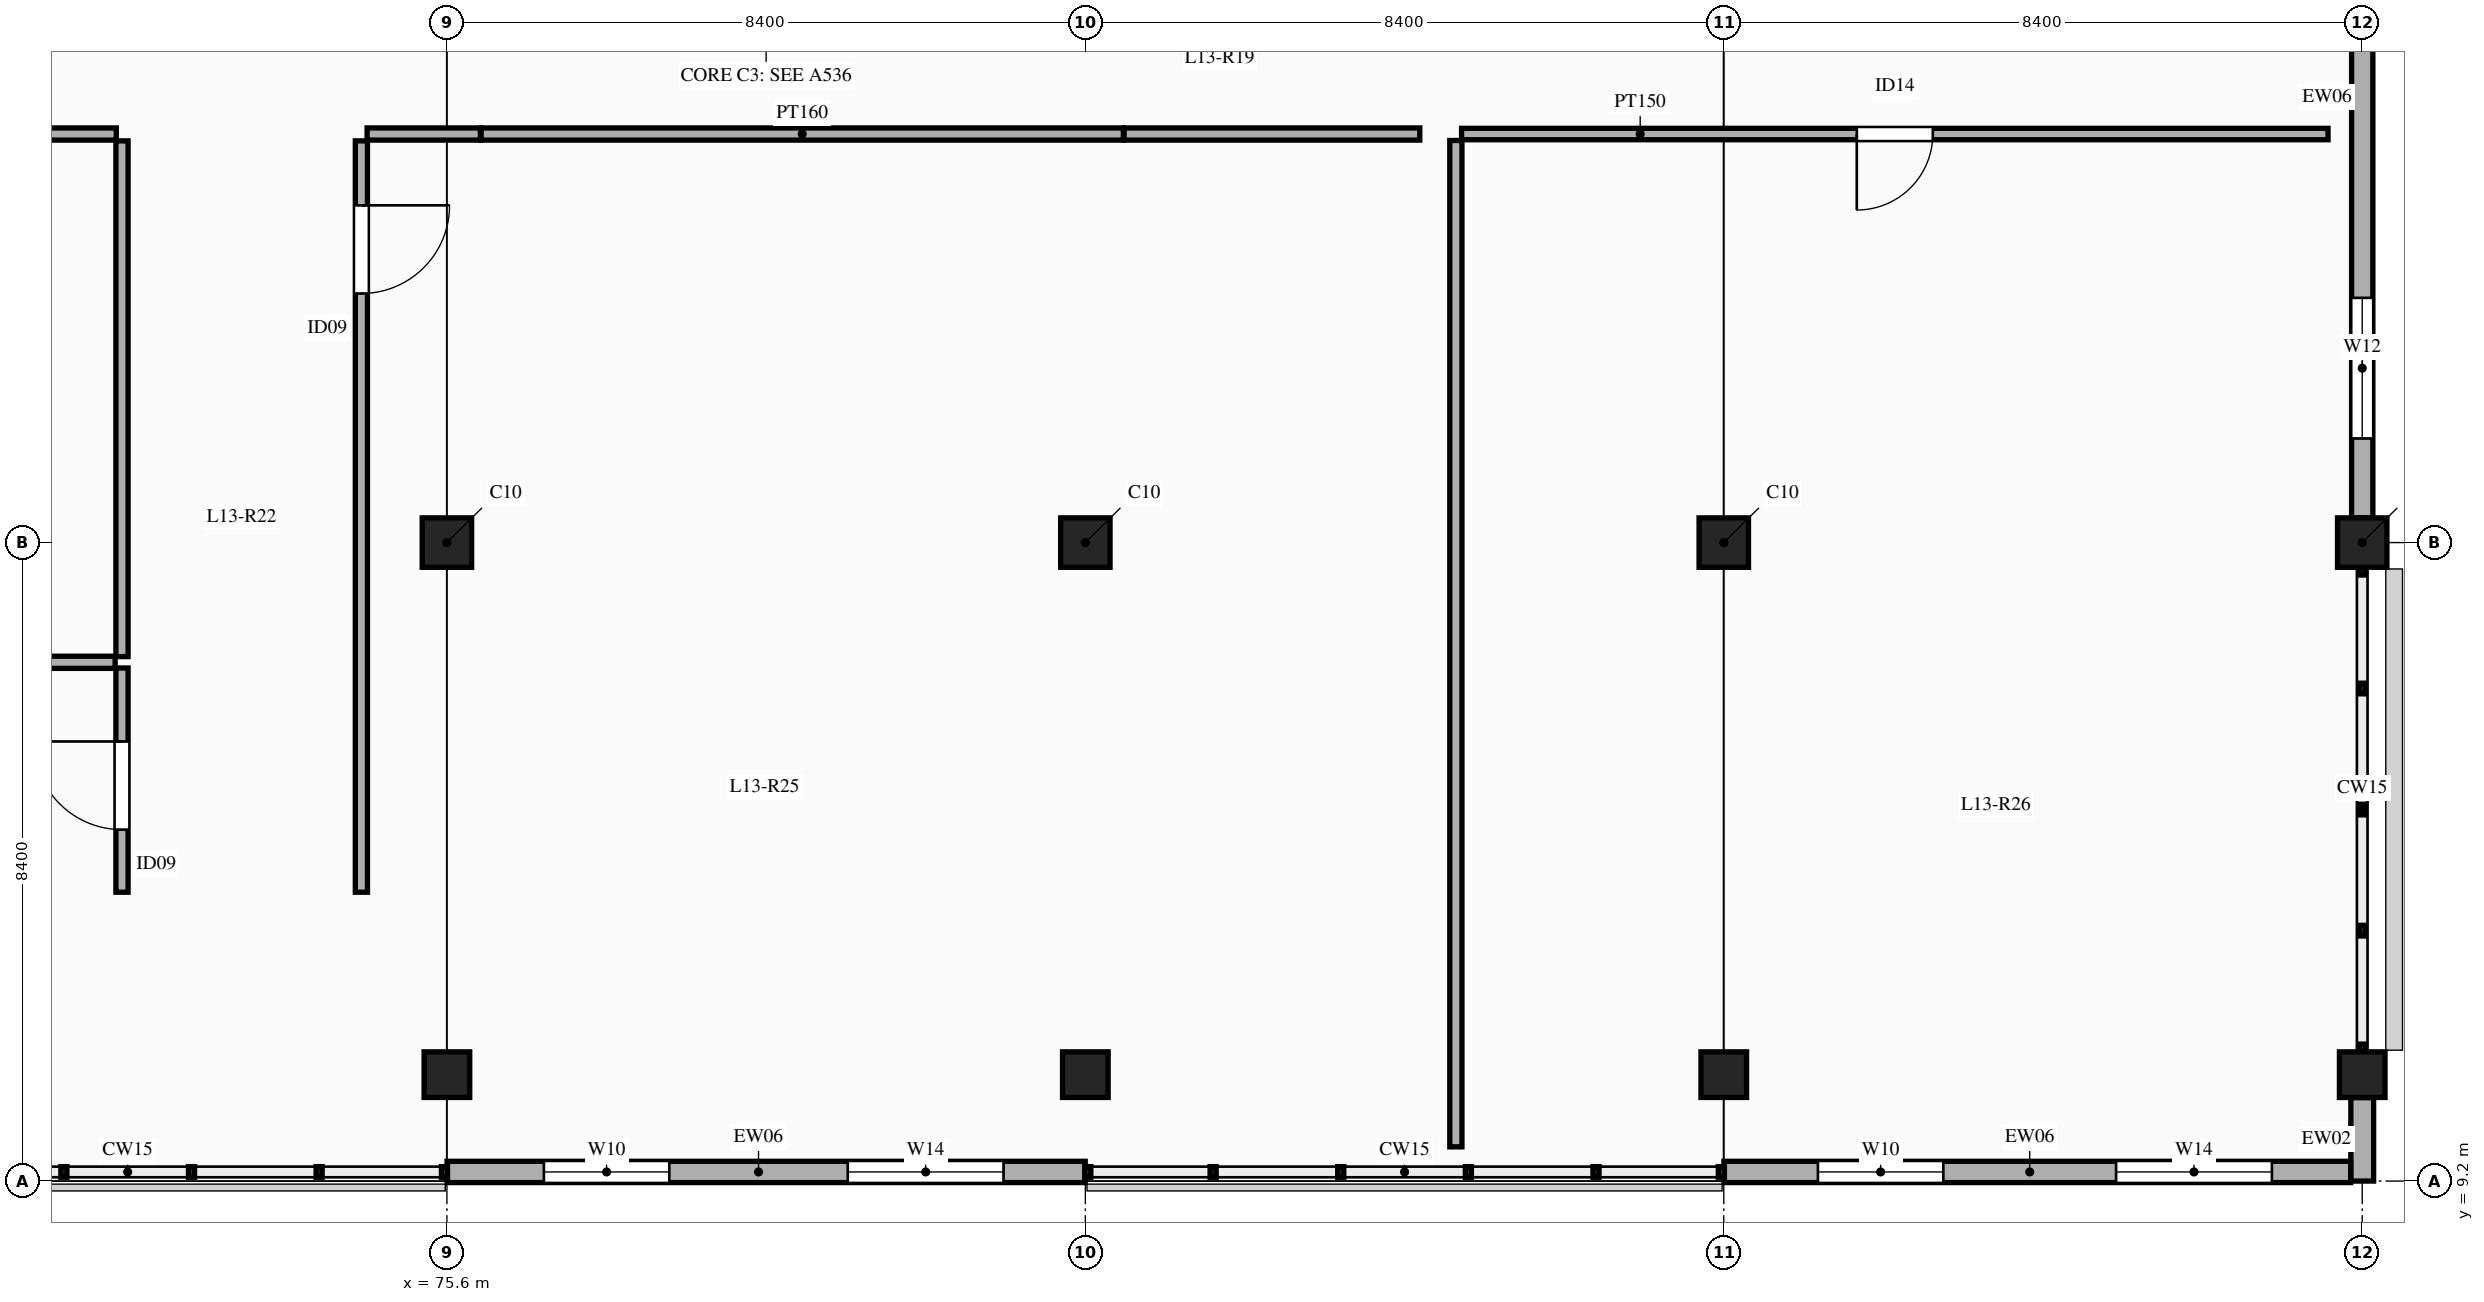
"""IFC4 building model, lengths in metres.
Left out: names, types, materials, properties, quantities, classifications, styles, units other than length and angle.
Written with IfcOpenShell. Run it as: python <this file> out.ifc"""

import sys

from ifc_helpers import new_model, si_unit, direction, frame, frame_2d, origin, origin_2d, place, context, subcontext, project, spatial, rectangle, extrude, element, fill, save


model = new_model("IFC4")
c1 = context("Model", 3, precision=1e-05, world=origin(), true_north=direction((0.0, 1.0)))
c2 = subcontext(c1, "Body", "Model", "MODEL_VIEW")
j1 = project(units=[si_unit("LENGTHUNIT", "METRE"), si_unit("PLANEANGLEUNIT", "RADIAN")], contexts=[c1])
p1 = place(None, origin())
s1 = spatial("IfcSite", under=j1, at=p1, CompositionType="ELEMENT")
p2 = place(p1, origin())
s2 = spatial("IfcBuilding", under=s1, at=p2, CompositionType="ELEMENT")
p3 = place(p2, frame((0.0, 0.0, 60.0)))
s3 = spatial("IfcBuildingStorey", under=s2, at=p3, CompositionType="ELEMENT", Elevation=60.0)
p4 = place(p3, frame((75.6, 10.6, 0.0), z_axis=(0.0, 0.0, 1.0), x_axis=(1.0, 0.0, 0.0)))
e1 = element("IfcColumn", 1, at=p4, inside=s3, PredefinedType="COLUMN", context=c2, shape_type="SweptSolid", body=[
    extrude(rectangle(XDim=0.6, YDim=0.6, at=origin_2d()), origin(), (0.0, 0.0, 1.0), 4.5),
])
p5 = place(p3, frame((75.6, 17.6, 0.0), z_axis=(0.0, 0.0, 1.0), x_axis=(1.0, 0.0, 0.0)))
e2 = element("IfcColumn", 2, at=p5, inside=s3, PredefinedType="COLUMN", context=c2, shape_type="SweptSolid", body=[
    extrude(rectangle(XDim=0.65, YDim=0.65, at=origin_2d()), origin(), (0.0, 0.0, 1.0), 4.5),
])
p6 = place(p3, frame((84.0, 10.6, 0.0), z_axis=(0.0, 0.0, 1.0), x_axis=(1.0, 0.0, 0.0)))
e3 = element("IfcColumn", 3, at=p6, inside=s3, PredefinedType="COLUMN", context=c2, shape_type="SweptSolid", body=[
    extrude(rectangle(XDim=0.6, YDim=0.6, at=origin_2d()), origin(), (0.0, 0.0, 1.0), 4.5),
])
p7 = place(p3, frame((84.0, 17.6, 0.0), z_axis=(0.0, 0.0, 1.0), x_axis=(1.0, 0.0, 0.0)))
e4 = element("IfcColumn", 4, at=p7, inside=s3, PredefinedType="COLUMN", context=c2, shape_type="SweptSolid", body=[
    extrude(rectangle(XDim=0.65, YDim=0.65, at=origin_2d()), origin(), (0.0, 0.0, 1.0), 4.5),
])
p8 = place(p3, frame((92.4, 10.6, 0.0), z_axis=(0.0, 0.0, 1.0), x_axis=(1.0, 0.0, 0.0)))
e5 = element("IfcColumn", 5, at=p8, inside=s3, PredefinedType="COLUMN", context=c2, shape_type="SweptSolid", body=[
    extrude(rectangle(XDim=0.6, YDim=0.6, at=origin_2d()), origin(), (0.0, 0.0, 1.0), 4.5),
])
p9 = place(p3, frame((92.4, 17.6, 0.0), z_axis=(0.0, 0.0, 1.0), x_axis=(1.0, 0.0, 0.0)))
e6 = element("IfcColumn", 6, at=p9, inside=s3, PredefinedType="COLUMN", context=c2, shape_type="SweptSolid", body=[
    extrude(rectangle(XDim=0.65, YDim=0.65, at=origin_2d()), origin(), (0.0, 0.0, 1.0), 4.5),
])
p10 = place(p3, frame((100.8, 10.6, 0.0), z_axis=(0.0, 0.0, 1.0), x_axis=(1.0, 0.0, 0.0)))
e7 = element("IfcColumn", 7, at=p10, inside=s3, PredefinedType="COLUMN", context=c2, shape_type="SweptSolid", body=[
    extrude(rectangle(XDim=0.6, YDim=0.6, at=origin_2d()), origin(), (0.0, 0.0, 1.0), 4.5),
])
p11 = place(p3, frame((100.8, 17.6, 0.0), z_axis=(0.0, 0.0, 1.0), x_axis=(1.0, 0.0, 0.0)))
e8 = element("IfcColumn", 8, at=p11, inside=s3, PredefinedType="COLUMN", context=c2, shape_type="SweptSolid", body=[
    extrude(rectangle(XDim=0.65, YDim=0.65, at=origin_2d()), origin(), (0.0, 0.0, 1.0), 4.5),
])
p12 = place(p3, frame((100.8, 9.2, 0.0), z_axis=(0.0, 0.0, 1.0), x_axis=(0.0, 1.0, 0.0)))
e9 = element("IfcWall", 9, at=p12, inside=s3, PredefinedType="SOLIDWALL", context=c2, shape_type="SweptSolid", body=[
    extrude(rectangle(XDim=1.098, YDim=0.3, at=frame_2d((0.549, 0.0))), origin(), (0.0, 0.0, 1.0), 3.55),
])
p13 = place(p3, frame((75.602, 9.32, 0.0), z_axis=(0.0, 0.0, 1.0), x_axis=(1.0, 0.0, 0.0)))
e10 = element("IfcWall", 10, at=p13, inside=s3, PredefinedType="ELEMENTEDWALL", context=c2, shape_type="SweptSolid", body=[
    extrude(rectangle(XDim=8.396, YDim=0.28, at=frame_2d((4.198, 0.0))), origin(), (0.0, 0.0, 1.0), 3.55),
])
p14 = place(p13, frame((1.274, 0.0, 0.9)))
e11 = element("IfcOpeningElement", 11, at=p14, cuts=e10, PredefinedType="OPENING", context=c2, shape_type="SweptSolid", body=[
    extrude(rectangle(XDim=1.65, YDim=1.95, at=frame_2d((0.825, 0.975))), frame((0.0, 0.15, 0.0), z_axis=(0.0, -1.0, 0.0), x_axis=(1.0, 0.0, 0.0)), (0.0, 0.0, 1.0), 0.3),
])
p15 = place(p13, frame((5.272, 0.0, 0.9)))
e12 = element("IfcOpeningElement", 12, at=p15, cuts=e10, PredefinedType="OPENING", context=c2, shape_type="SweptSolid", body=[
    extrude(rectangle(XDim=2.05, YDim=2.1, at=frame_2d((1.025, 1.05))), frame((0.0, 0.15, 0.0), z_axis=(0.0, -1.0, 0.0), x_axis=(1.0, 0.0, 0.0)), (0.0, 0.0, 1.0), 0.3),
])
p16 = place(p3, frame((92.402, 9.32, 0.0), z_axis=(0.0, 0.0, 1.0), x_axis=(1.0, 0.0, 0.0)))
e13 = element("IfcWall", 13, at=p16, inside=s3, PredefinedType="ELEMENTEDWALL", context=c2, shape_type="SweptSolid", body=[
    extrude(rectangle(XDim=8.246, YDim=0.28, at=frame_2d((4.123, 0.0))), origin(), (0.0, 0.0, 1.0), 3.55),
])
p17 = place(p16, frame((1.237, 0.0, 0.9)))
e14 = element("IfcOpeningElement", 14, at=p17, cuts=e13, PredefinedType="OPENING", context=c2, shape_type="SweptSolid", body=[
    extrude(rectangle(XDim=1.65, YDim=1.95, at=frame_2d((0.825, 0.975))), frame((0.0, 0.15, 0.0), z_axis=(0.0, -1.0, 0.0), x_axis=(1.0, 0.0, 0.0)), (0.0, 0.0, 1.0), 0.3),
])
p18 = place(p16, frame((5.159, 0.0, 0.9)))
e15 = element("IfcOpeningElement", 15, at=p18, cuts=e13, PredefinedType="OPENING", context=c2, shape_type="SweptSolid", body=[
    extrude(rectangle(XDim=2.05, YDim=2.1, at=frame_2d((1.025, 1.05))), frame((0.0, 0.15, 0.0), z_axis=(0.0, -1.0, 0.0), x_axis=(1.0, 0.0, 0.0)), (0.0, 0.0, 1.0), 0.3),
])
p19 = place(p3, frame((100.8, 17.927, 0.0), z_axis=(0.0, 0.0, 1.0), x_axis=(0.0, 1.0, 0.0)))
e16 = element("IfcWall", 16, at=p19, inside=s3, PredefinedType="ELEMENTEDWALL", context=c2, shape_type="SweptSolid", body=[
    extrude(rectangle(XDim=7.871, YDim=0.28, at=frame_2d((3.936, 0.0))), origin(), (0.0, 0.0, 1.0), 3.55),
])
p20 = place(p19, frame((1.043, 0.0, 0.9)))
e17 = element("IfcOpeningElement", 17, at=p20, cuts=e16, PredefinedType="OPENING", context=c2, shape_type="SweptSolid", body=[
    extrude(rectangle(XDim=1.85, YDim=2.05, at=frame_2d((0.925, 1.025))), frame((0.0, 0.15, 0.0), z_axis=(0.0, -1.0, 0.0), x_axis=(1.0, 0.0, 0.0)), (0.0, 0.0, 1.0), 0.3),
])
p21 = place(p3, frame((76.05, 22.975, 0.0), z_axis=(0.0, 0.0, 1.0), x_axis=(1.0, 0.0, 0.0)))
e18 = element("IfcWall", 18, at=p21, inside=s3, PredefinedType="PARTITIONING", context=c2, shape_type="SweptSolid", body=[
    extrude(rectangle(XDim=8.45, YDim=0.16, at=frame_2d((4.225, 0.0))), origin(), (0.0, 0.0, 1.0), 3.45),
])
p22 = place(p3, frame((84.51, 22.975, 0.0), z_axis=(0.0, 0.0, 1.0), x_axis=(1.0, 0.0, 0.0)))
e19 = element("IfcWall", 19, at=p22, inside=s3, PredefinedType="PARTITIONING", context=c2, shape_type="SweptSolid", body=[
    extrude(rectangle(XDim=3.89, YDim=0.16, at=frame_2d((1.945, 0.0))), origin(), (0.0, 0.0, 1.0), 3.45),
])
p23 = place(p3, frame((59.25, 22.975, 0.0), z_axis=(0.0, 0.0, 1.0), x_axis=(1.0, 0.0, 0.0)))
e20 = element("IfcWall", 20, at=p23, inside=s3, PredefinedType="PARTITIONING", context=c2, shape_type="SweptSolid", body=[
    extrude(rectangle(XDim=12.0, YDim=0.16, at=frame_2d((6.0, 0.0))), origin(), (0.0, 0.0, 1.0), 3.45),
])
p24 = place(p23, frame((5.345, 0.0, 0.0)))
e21 = element("IfcOpeningElement", 21, at=p24, cuts=e20, PredefinedType="OPENING", context=c2, shape_type="SweptSolid", body=[
    extrude(rectangle(XDim=1.16, YDim=2.2, at=frame_2d((0.58, 1.1))), frame((0.0, 0.09, 0.0), z_axis=(0.0, -1.0, 0.0), x_axis=(1.0, 0.0, 0.0)), (0.0, 0.0, 1.0), 0.18),
])
p25 = place(p3, frame((74.55, 22.975, 0.0), z_axis=(0.0, 0.0, 1.0), x_axis=(1.0, 0.0, 0.0)))
e22 = element("IfcWall", 22, at=p25, inside=s3, PredefinedType="PARTITIONING", context=c2, shape_type="SweptSolid", body=[
    extrude(rectangle(XDim=1.49, YDim=0.16, at=frame_2d((0.745, 0.0))), origin(), (0.0, 0.0, 1.0), 3.45),
])
p26 = place(p3, frame((88.95, 22.975, 0.0), z_axis=(0.0, 0.0, 1.0), x_axis=(1.0, 0.0, 0.0)))
e23 = element("IfcWall", 23, at=p26, inside=s3, PredefinedType="PARTITIONING", context=c2, shape_type="SweptSolid", body=[
    extrude(rectangle(XDim=11.4, YDim=0.15, at=frame_2d((5.7, 0.0))), origin(), (0.0, 0.0, 1.0), 3.45),
])
p27 = place(p26, frame((5.2, 0.0, 0.0)))
e24 = element("IfcOpeningElement", 24, at=p27, cuts=e23, PredefinedType="OPENING", context=c2, shape_type="SweptSolid", body=[
    extrude(rectangle(XDim=1.0, YDim=2.15, at=frame_2d((0.5, 1.075))), frame((0.0, 0.085, 0.0), z_axis=(0.0, -1.0, 0.0), x_axis=(1.0, 0.0, 0.0)), (0.0, 0.0, 1.0), 0.17),
])
p28 = place(p3, frame((71.325, 16.1, 0.0), z_axis=(0.0, 0.0, 1.0), x_axis=(0.0, 1.0, 0.0)))
e25 = element("IfcWall", 25, at=p28, inside=s3, PredefinedType="PARTITIONING", context=c2, shape_type="SweptSolid", body=[
    extrude(rectangle(XDim=6.785, YDim=0.16, at=frame_2d((3.393, 0.0))), origin(), (0.0, 0.0, 1.0), 3.45),
])
p29 = place(p3, frame((71.325, 13.0, 0.0), z_axis=(0.0, 0.0, 1.0), x_axis=(0.0, 1.0, 0.0)))
e26 = element("IfcWall", 26, at=p29, inside=s3, PredefinedType="PARTITIONING", context=c2, shape_type="SweptSolid", body=[
    extrude(rectangle(XDim=2.95, YDim=0.16, at=frame_2d((1.475, 0.0))), origin(), (0.0, 0.0, 1.0), 3.45),
])
p30 = place(p29, frame((0.823, 0.0, 0.0)))
e27 = element("IfcOpeningElement", 27, at=p30, cuts=e26, PredefinedType="OPENING", context=c2, shape_type="SweptSolid", body=[
    extrude(rectangle(XDim=1.16, YDim=2.2, at=frame_2d((0.58, 1.1))), frame((0.0, 0.09, 0.0), z_axis=(0.0, -1.0, 0.0), x_axis=(1.0, 0.0, 0.0)), (0.0, 0.0, 1.0), 0.18),
])
p31 = place(p3, frame((74.475, 13.0, 0.0), z_axis=(0.0, 0.0, 1.0), x_axis=(0.0, 1.0, 0.0)))
e28 = element("IfcWall", 28, at=p31, inside=s3, PredefinedType="PARTITIONING", context=c2, shape_type="SweptSolid", body=[
    extrude(rectangle(XDim=9.885, YDim=0.16, at=frame_2d((4.942, 0.0))), origin(), (0.0, 0.0, 1.0), 3.45),
])
p32 = place(p31, frame((7.877, 0.0, 0.0)))
e29 = element("IfcOpeningElement", 29, at=p32, cuts=e28, PredefinedType="OPENING", context=c2, shape_type="SweptSolid", body=[
    extrude(rectangle(XDim=1.16, YDim=2.2, at=frame_2d((0.58, 1.1))), frame((0.0, 0.09, 0.0), z_axis=(0.0, -1.0, 0.0), x_axis=(1.0, 0.0, 0.0)), (0.0, 0.0, 1.0), 0.18),
])
p33 = place(p3, frame((59.25, 16.025, 0.0), z_axis=(0.0, 0.0, 1.0), x_axis=(1.0, 0.0, 0.0)))
e30 = element("IfcWall", 30, at=p33, inside=s3, PredefinedType="PARTITIONING", context=c2, shape_type="SweptSolid", body=[
    extrude(rectangle(XDim=11.985, YDim=0.16, at=frame_2d((5.993, 0.0))), origin(), (0.0, 0.0, 1.0), 3.45),
])
p34 = place(p3, frame((88.875, 9.65, 0.0), z_axis=(0.0, 0.0, 1.0), x_axis=(0.0, 1.0, 0.0)))
e31 = element("IfcWall", 31, at=p34, inside=s3, PredefinedType="PARTITIONING", context=c2, shape_type="SweptSolid", body=[
    extrude(rectangle(XDim=13.24, YDim=0.16, at=frame_2d((6.62, 0.0))), origin(), (0.0, 0.0, 1.0), 3.45),
])
p35 = place(p14, origin())
e32 = element("IfcWindow", 32, at=p35, inside=s3, PartitioningType="DOUBLE_PANEL_HORIZONTAL", PredefinedType="WINDOW", context=c2, shape_type="SweptSolid", body=[
    extrude(rectangle(XDim=1.65, YDim=1.95, at=frame_2d((0.825, 0.975))), frame((0.0, 0.03, 0.0), z_axis=(0.0, -1.0, 0.0), x_axis=(1.0, 0.0, 0.0)), (0.0, 0.0, 1.0), 0.06),
])
fill(e11, e32)
p36 = place(p15, origin())
e33 = element("IfcWindow", 33, at=p36, inside=s3, PartitioningType="TRIPLE_PANEL_VERTICAL", PredefinedType="WINDOW", context=c2, shape_type="SweptSolid", body=[
    extrude(rectangle(XDim=2.05, YDim=2.1, at=frame_2d((1.025, 1.05))), frame((0.0, 0.03, 0.0), z_axis=(0.0, -1.0, 0.0), x_axis=(1.0, 0.0, 0.0)), (0.0, 0.0, 1.0), 0.06),
])
fill(e12, e33)
p37 = place(p17, origin())
e34 = element("IfcWindow", 34, at=p37, inside=s3, PartitioningType="DOUBLE_PANEL_HORIZONTAL", PredefinedType="WINDOW", context=c2, shape_type="SweptSolid", body=[
    extrude(rectangle(XDim=1.65, YDim=1.95, at=frame_2d((0.825, 0.975))), frame((0.0, 0.03, 0.0), z_axis=(0.0, -1.0, 0.0), x_axis=(1.0, 0.0, 0.0)), (0.0, 0.0, 1.0), 0.06),
])
fill(e14, e34)
p38 = place(p18, origin())
e35 = element("IfcWindow", 35, at=p38, inside=s3, PartitioningType="TRIPLE_PANEL_VERTICAL", PredefinedType="WINDOW", context=c2, shape_type="SweptSolid", body=[
    extrude(rectangle(XDim=2.05, YDim=2.1, at=frame_2d((1.025, 1.05))), frame((0.0, 0.03, 0.0), z_axis=(0.0, -1.0, 0.0), x_axis=(1.0, 0.0, 0.0)), (0.0, 0.0, 1.0), 0.06),
])
fill(e15, e35)
p39 = place(p20, origin())
e36 = element("IfcWindow", 36, at=p39, inside=s3, PartitioningType="DOUBLE_PANEL_HORIZONTAL", PredefinedType="WINDOW", context=c2, shape_type="SweptSolid", body=[
    extrude(rectangle(XDim=1.85, YDim=2.05, at=frame_2d((0.925, 1.025))), frame((0.0, 0.03, 0.0), z_axis=(0.0, -1.0, 0.0), x_axis=(1.0, 0.0, 0.0)), (0.0, 0.0, 1.0), 0.06),
])
fill(e17, e36)
p40 = place(p30, origin())
e37 = element("IfcDoor", 37, at=p40, inside=s3, OperationType="SINGLE_SWING_RIGHT", PredefinedType="DOOR", context=c2, shape_type="SweptSolid", body=[
    extrude(rectangle(XDim=1.16, YDim=2.2, at=frame_2d((0.58, 1.1))), frame((0.0, 0.025, 0.0), z_axis=(0.0, -1.0, 0.0), x_axis=(1.0, 0.0, 0.0)), (0.0, 0.0, 1.0), 0.05),
])
fill(e27, e37)
p41 = place(p32, frame((1.16, 0.0, 0.0), z_axis=(0.0, 0.0, 1.0), x_axis=(-1.0, 0.0, 0.0)))
e38 = element("IfcDoor", 38, at=p41, inside=s3, OperationType="SINGLE_SWING_LEFT", PredefinedType="DOOR", context=c2, shape_type="SweptSolid", body=[
    extrude(rectangle(XDim=1.16, YDim=2.2, at=frame_2d((0.58, 1.1))), frame((0.0, 0.025, 0.0), z_axis=(0.0, -1.0, 0.0), x_axis=(1.0, 0.0, 0.0)), (0.0, 0.0, 1.0), 0.05),
])
fill(e29, e38)
p42 = place(p27, frame((1.0, 0.0, 0.0), z_axis=(0.0, 0.0, 1.0), x_axis=(-1.0, 0.0, 0.0)))
e39 = element("IfcDoor", 39, at=p42, inside=s3, OperationType="SINGLE_SWING_RIGHT", PredefinedType="DOOR", context=c2, shape_type="SweptSolid", body=[
    extrude(rectangle(XDim=1.0, YDim=2.15, at=frame_2d((0.5, 1.075))), frame((0.0, 0.025, 0.0), z_axis=(0.0, -1.0, 0.0), x_axis=(1.0, 0.0, 0.0)), (0.0, 0.0, 1.0), 0.05),
])
fill(e24, e39)
save(model, sys.argv[1])
